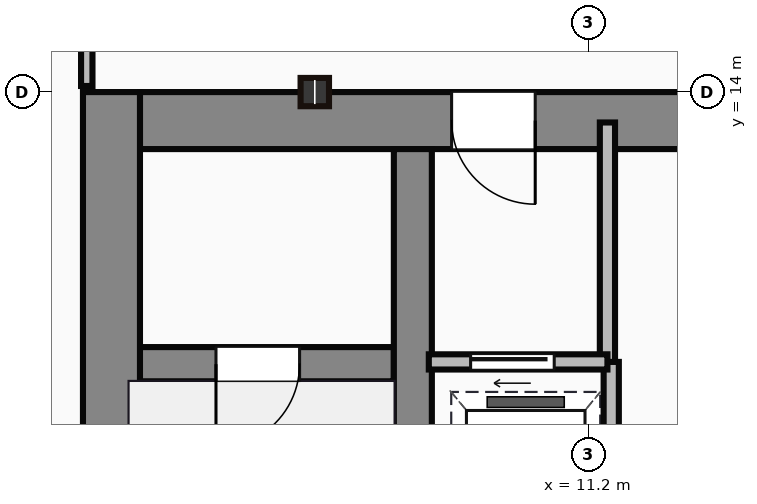
"""IFC4 building model, lengths in metres.
Left out: names, types, materials, properties, quantities, classifications, styles, units other than length and angle.
Written with IfcOpenShell. Run it as: python <this file> out.ifc"""

import sys

from ifc_helpers import new_model, si_unit, direction, frame, frame_2d, origin, origin_2d, place, context, subcontext, project, spatial, rectangle, i_section, extrude, source, transform, mapped, element, fill, save


model = new_model("IFC4")
c1 = context("Model", 3, precision=1e-05, world=origin(), true_north=direction((0.0, 1.0)))
c2 = subcontext(c1, "Body", "Model", "MODEL_VIEW")
j1 = project(units=[si_unit("LENGTHUNIT", "METRE"), si_unit("PLANEANGLEUNIT", "RADIAN")], contexts=[c1])
p1 = place(None, origin())
s1 = spatial("IfcSite", under=j1, at=p1, CompositionType="ELEMENT")
p2 = place(p1, origin())
s2 = spatial("IfcBuilding", under=s1, at=p2, CompositionType="ELEMENT")
p3 = place(p2, frame((0.0, 0.0, 140.6)))
s3 = spatial("IfcBuildingStorey", under=s2, at=p3, CompositionType="ELEMENT", Elevation=140.6)
m1 = source(origin(), c2, "Body", "SweptSolid", [
    extrude(rectangle(XDim=13.1, YDim=0.75, at=frame_2d((6.55, 0.0))), origin(), (0.0, 0.0, 1.0), 3.65),
])
p4 = place(p3, frame((4.925, 0.9, 0.0), z_axis=(0.0, 0.0, 1.0), x_axis=(0.0, 1.0, 0.0)))
e1 = element("IfcWall", 1, at=p4, inside=s3, PredefinedType="SHEAR", context=c2, shape_type="MappedRepresentation", body=[
    mapped(m1, transform((0.0, 0.0, 0.0))),
])
m2 = source(origin(), c2, "Body", "SweptSolid", [
    extrude(rectangle(XDim=9.1, YDim=0.75, at=frame_2d((4.55, 0.0))), origin(), (0.0, 0.0, 1.0), 3.65),
])
p5 = place(p3, frame((5.3, 13.625, 0.0), z_axis=(0.0, 0.0, 1.0), x_axis=(1.0, 0.0, 0.0)))
e2 = element("IfcWall", 2, at=p5, inside=s3, PredefinedType="SHEAR", context=c2, shape_type="MappedRepresentation", body=[
    mapped(m2, transform((0.0, 0.0, 0.0))),
])
p6 = place(p5, frame((4.1, 0.0, 0.0)))
e3 = element("IfcOpeningElement", 3, at=p6, cuts=e2, PredefinedType="OPENING", context=c2, shape_type="SweptSolid", body=[
    extrude(rectangle(XDim=1.1, YDim=2.15, at=frame_2d((0.55, 1.075))), frame((0.0, 0.385, 0.0), z_axis=(0.0, -1.0, 0.0), x_axis=(1.0, 0.0, 0.0)), (0.0, 0.0, 1.0), 0.77),
])
m3 = source(origin(), c2, "Body", "SweptSolid", [
    extrude(rectangle(XDim=12.35, YDim=0.5, at=frame_2d((6.175, 0.0))), origin(), (0.0, 0.0, 1.0), 3.65),
])
p7 = place(p3, frame((8.89, 0.9, 0.0), z_axis=(0.0, 0.0, 1.0), x_axis=(0.0, 1.0, 0.0)))
e4 = element("IfcWall", 4, at=p7, inside=s3, PredefinedType="SHEAR", context=c2, shape_type="MappedRepresentation", body=[
    mapped(m3, transform((0.0, 0.0, 0.0))),
])
m4 = source(origin(), c2, "Body", "SweptSolid", [
    extrude(rectangle(XDim=3.39, YDim=0.45, at=frame_2d((1.695, 0.0))), origin(), (0.0, 0.0, 1.0), 3.65),
])
p8 = place(p3, frame((5.25, 10.42, 0.0), z_axis=(0.0, 0.0, 1.0), x_axis=(1.0, 0.0, 0.0)))
e5 = element("IfcWall", 5, at=p8, inside=s3, PredefinedType="SHEAR", context=c2, shape_type="MappedRepresentation", body=[
    mapped(m4, transform((0.0, 0.0, 0.0))),
])
p9 = place(p8, frame((1.05, 0.0, 0.0)))
e6 = element("IfcOpeningElement", 6, at=p9, cuts=e5, PredefinedType="OPENING", context=c2, shape_type="SweptSolid", body=[
    extrude(rectangle(XDim=1.1, YDim=2.15, at=frame_2d((0.55, 1.075))), frame((0.0, 0.235, 0.0), z_axis=(0.0, -1.0, 0.0), x_axis=(1.0, 0.0, 0.0)), (0.0, 0.0, 1.0), 0.47),
])
m5 = source(origin(), c2, "Body", "SweptSolid", [
    extrude(i_section(OverallWidth=0.374, OverallDepth=0.372, WebThickness=0.016, FlangeThickness=0.026, at=origin_2d()), origin(), (0.0, 0.0, 1.0), 3.65),
])
p10 = place(p3, frame((7.6, 14.0, 0.0), z_axis=(0.0, 0.0, 1.0), x_axis=(1.0, 0.0, 0.0)))
e7 = element("IfcColumn", 7, at=p10, inside=s3, PredefinedType="COLUMN", context=c2, shape_type="MappedRepresentation", body=[
    mapped(m5, transform((0.0, 0.0, 0.0))),
])
m6 = source(origin(), c2, "Body", "SweptSolid", [
    extrude(rectangle(XDim=3.18, YDim=0.2, at=frame_2d((1.59, 0.0))), origin(), (0.0, 0.0, 1.0), 3.4),
])
p11 = place(p3, frame((11.45, 10.42, 0.0), z_axis=(0.0, 0.0, 1.0), x_axis=(0.0, 1.0, 0.0)))
e8 = element("IfcWall", 8, at=p11, inside=s3, PredefinedType="PARTITIONING", context=c2, shape_type="MappedRepresentation", body=[
    mapped(m6, transform((0.0, 0.0, 0.0))),
])
m7 = source(origin(), c2, "Body", "SweptSolid", [
    extrude(rectangle(XDim=2.35, YDim=0.2, at=frame_2d((1.175, 0.0))), origin(), (0.0, 0.0, 1.0), 3.4),
])
p12 = place(p3, frame((9.1, 10.45, 0.0), z_axis=(0.0, 0.0, 1.0), x_axis=(1.0, 0.0, 0.0)))
e9 = element("IfcWall", 9, at=p12, inside=s3, PredefinedType="PARTITIONING", context=c2, shape_type="MappedRepresentation", body=[
    mapped(m7, transform((0.0, 0.0, 0.0))),
])
p13 = place(p12, frame((0.55, 0.0, 0.0)))
e10 = element("IfcOpeningElement", 10, at=p13, cuts=e9, PredefinedType="OPENING", context=c2, shape_type="SweptSolid", body=[
    extrude(rectangle(XDim=1.1, YDim=2.15, at=frame_2d((0.55, 1.075))), frame((0.0, 0.11, 0.0), z_axis=(0.0, -1.0, 0.0), x_axis=(1.0, 0.0, 0.0)), (0.0, 0.0, 1.0), 0.22),
])
m8 = source(origin(), c2, "Body", "SweptSolid", [
    extrude(rectangle(XDim=9.6, YDim=0.2, at=frame_2d((4.8, 0.0))), origin(), (0.0, 0.0, 1.0), 3.4),
])
p14 = place(p3, frame((11.5, 0.85, 0.0), z_axis=(0.0, 0.0, 1.0), x_axis=(0.0, 1.0, 0.0)))
e11 = element("IfcWall", 11, at=p14, inside=s3, PredefinedType="PARTITIONING", context=c2, shape_type="MappedRepresentation", body=[
    mapped(m8, transform((0.0, 0.0, 0.0))),
])
p15 = place(p14, frame((4.2, 0.0, 0.0)))
e12 = element("IfcOpeningElement", 12, at=p15, cuts=e11, PredefinedType="OPENING", context=c2, shape_type="SweptSolid", body=[
    extrude(rectangle(XDim=1.1, YDim=2.15, at=frame_2d((0.55, 1.075))), frame((0.0, 0.11, 0.0), z_axis=(0.0, -1.0, 0.0), x_axis=(1.0, 0.0, 0.0)), (0.0, 0.0, 1.0), 0.22),
])
p16 = place(p14, frame((0.9, 0.0, 0.0)))
e13 = element("IfcOpeningElement", 13, at=p16, cuts=e11, PredefinedType="OPENING", context=c2, shape_type="SweptSolid", body=[
    extrude(rectangle(XDim=1.2, YDim=2.15, at=frame_2d((0.6, 1.075))), frame((0.0, 0.11, 0.0), z_axis=(0.0, -1.0, 0.0), x_axis=(1.0, 0.0, 0.0)), (0.0, 0.0, 1.0), 0.22),
])
m9 = source(origin(), c2, "Body", "SweptSolid", [
    extrude(rectangle(XDim=2.22, YDim=0.15, at=frame_2d((1.11, 0.0))), origin(), (0.0, 0.0, 1.0), 3.4),
])
p17 = place(p3, frame((4.6, 14.08, 0.0), z_axis=(0.0, 0.0, 1.0), x_axis=(0.0, 1.0, 0.0)))
e14 = element("IfcWall", 14, at=p17, inside=s3, PredefinedType="PARTITIONING", context=c2, shape_type="MappedRepresentation", body=[
    mapped(m9, transform((0.0, 0.0, 0.0))),
])
m10 = source(origin(), c2, "Body", "SweptSolid", [
    extrude(rectangle(XDim=1.1, YDim=2.15, at=frame_2d((0.55, 1.075))), frame((0.0, 0.025, 0.0), z_axis=(0.0, -1.0, 0.0), x_axis=(1.0, 0.0, 0.0)), (0.0, 0.0, 1.0), 0.05),
])
p18 = place(p9, frame((1.1, 0.0, 0.0), z_axis=(0.0, 0.0, 1.0), x_axis=(-1.0, 0.0, 0.0)))
e15 = element("IfcDoor", 15, at=p18, inside=s3, OperationType="SINGLE_SWING_LEFT", PredefinedType="DOOR", context=c2, shape_type="MappedRepresentation", body=[
    mapped(m10, transform((0.0, 0.0, 0.0))),
])
fill(e6, e15)
p19 = place(p6, origin())
e16 = element("IfcDoor", 16, at=p19, inside=s3, OperationType="SINGLE_SWING_RIGHT", PredefinedType="DOOR", context=c2, shape_type="MappedRepresentation", body=[
    mapped(m10, transform((0.0, 0.0, 0.0))),
])
fill(e3, e16)
p20 = place(p13, origin())
e17 = element("IfcDoor", 17, at=p20, inside=s3, OperationType="SLIDING_TO_LEFT", PredefinedType="DOOR", context=c2, shape_type="MappedRepresentation", body=[
    mapped(m10, transform((0.0, 0.0, 0.0))),
])
fill(e10, e17)
save(model, sys.argv[1])
